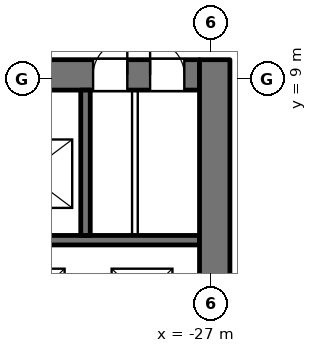
"""IFC4 building model, lengths in metres.
Left out: names, types, materials, properties, quantities, classifications, styles, units other than length and angle.
Written with IfcOpenShell. Run it as: python <this file> out.ifc"""

import sys

from ifc_helpers import new_model, si_unit, direction, frame, frame_2d, origin, place, context, subcontext, project, spatial, rectangle, extrude, element, fill, save


model = new_model("IFC4")
c1 = context("Model", 3, precision=1e-05, world=origin(), true_north=direction((0.0, 1.0)))
c2 = subcontext(c1, "Body", "Model", "MODEL_VIEW")
j1 = project(units=[si_unit("LENGTHUNIT", "METRE"), si_unit("PLANEANGLEUNIT", "RADIAN")], contexts=[c1])
p1 = place(None, origin())
s1 = spatial("IfcSite", under=j1, at=p1, CompositionType="ELEMENT")
p2 = place(p1, origin())
s2 = spatial("IfcBuilding", under=s1, at=p2, CompositionType="ELEMENT")
p3 = place(p2, frame((0.0, 0.0, 22.8)))
s3 = spatial("IfcBuildingStorey", under=s2, at=p3, CompositionType="ELEMENT", Elevation=22.8)
p4 = place(p3, frame((-44.7, 4.75, 0.0), z_axis=(0.0, 0.0, 1.0), x_axis=(1.0, 0.0, 0.0)))
e1 = element("IfcWall", 1, at=p4, inside=s3, PredefinedType="SHEAR", context=c2, shape_type="SweptSolid", body=[
    extrude(rectangle(XDim=17.4, YDim=0.25, at=frame_2d((8.7, 0.0))), origin(), (0.0, 0.0, 1.0), 4.5),
])
p5 = place(p3, frame((-44.7, 9.1, 0.0), z_axis=(0.0, 0.0, 1.0), x_axis=(1.0, 0.0, 0.0)))
e2 = element("IfcWall", 2, at=p5, inside=s3, PredefinedType="SHEAR", context=c2, shape_type="SweptSolid", body=[
    extrude(rectangle(XDim=17.4, YDim=0.8, at=frame_2d((8.7, 0.0))), origin(), (0.0, 0.0, 1.0), 4.5),
])
p6 = place(p5, frame((8.9, 0.0, 0.0)))
e3 = element("IfcOpeningElement", 3, at=p6, cuts=e2, PredefinedType="OPENING", context=c2, shape_type="SweptSolid", body=[
    extrude(rectangle(XDim=1.2, YDim=2.1, at=frame_2d((0.6, 1.05))), frame((0.0, 0.41, 0.0), z_axis=(0.0, -1.0, 0.0), x_axis=(1.0, 0.0, 0.0)), (0.0, 0.0, 1.0), 0.82),
])
p7 = place(p5, frame((14.6, 0.0, 0.0)))
e4 = element("IfcOpeningElement", 4, at=p7, cuts=e2, PredefinedType="OPENING", context=c2, shape_type="SweptSolid", body=[
    extrude(rectangle(XDim=0.9, YDim=2.1, at=frame_2d((0.45, 1.05))), frame((0.0, 0.41, 0.0), z_axis=(0.0, -1.0, 0.0), x_axis=(1.0, 0.0, 0.0)), (0.0, 0.0, 1.0), 0.82),
])
p8 = place(p5, frame((16.1, 0.0, 0.0)))
e5 = element("IfcOpeningElement", 5, at=p8, cuts=e2, PredefinedType="OPENING", context=c2, shape_type="SweptSolid", body=[
    extrude(rectangle(XDim=0.9, YDim=2.1, at=frame_2d((0.45, 1.05))), frame((0.0, 0.41, 0.0), z_axis=(0.0, -1.0, 0.0), x_axis=(1.0, 0.0, 0.0)), (0.0, 0.0, 1.0), 0.82),
])
p9 = place(p3, frame((-30.3, 4.875, 0.0), z_axis=(0.0, 0.0, 1.0), x_axis=(0.0, 1.0, 0.0)))
e6 = element("IfcWall", 6, at=p9, inside=s3, PredefinedType="SHEAR", context=c2, shape_type="SweptSolid", body=[
    extrude(rectangle(XDim=3.825, YDim=0.25, at=frame_2d((1.913, 0.0))), origin(), (0.0, 0.0, 1.0), 4.5),
])
p10 = place(p3, frame((-29.0, 4.875, 0.0), z_axis=(0.0, 0.0, 1.0), x_axis=(0.0, 1.0, 0.0)))
e7 = element("IfcWall", 7, at=p10, inside=s3, PredefinedType="PARTITIONING", context=c2, shape_type="SweptSolid", body=[
    extrude(rectangle(XDim=3.825, YDim=0.15, at=frame_2d((1.913, 0.0))), origin(), (0.0, 0.0, 1.0), 4.5),
])
p11 = place(p3, frame((-26.9, -9.5, 0.0), z_axis=(0.0, 0.0, 1.0), x_axis=(0.0, 1.0, 0.0)))
e8 = element("IfcWall", 8, at=p11, inside=s3, PredefinedType="SHEAR", context=c2, shape_type="SweptSolid", body=[
    extrude(rectangle(XDim=19.0, YDim=0.8, at=frame_2d((9.5, 0.0))), origin(), (0.0, 0.0, 1.0), 4.5),
])
p12 = place(p11, frame((8.3, 0.0, 0.0)))
e9 = element("IfcOpeningElement", 9, at=p12, cuts=e8, PredefinedType="OPENING", context=c2, shape_type="SweptSolid", body=[
    extrude(rectangle(XDim=2.4, YDim=2.1, at=frame_2d((1.2, 1.05))), frame((0.0, 0.41, 0.0), z_axis=(0.0, -1.0, 0.0), x_axis=(1.0, 0.0, 0.0)), (0.0, 0.0, 1.0), 0.82),
])
p13 = place(p7, origin())
e10 = element("IfcDoor", 10, at=p13, inside=s3, OperationType="SINGLE_SWING_RIGHT", PredefinedType="DOOR", context=c2, shape_type="SweptSolid", body=[
    extrude(rectangle(XDim=0.9, YDim=2.1, at=frame_2d((0.45, 1.05))), frame((0.0, -0.225, 0.0), z_axis=(0.0, -1.0, 0.0), x_axis=(1.0, 0.0, 0.0)), (0.0, 0.0, 1.0), 0.05),
])
fill(e4, e10)
p14 = place(p8, origin())
e11 = element("IfcDoor", 11, at=p14, inside=s3, OperationType="SINGLE_SWING_LEFT", PredefinedType="DOOR", context=c2, shape_type="SweptSolid", body=[
    extrude(rectangle(XDim=0.9, YDim=2.1, at=frame_2d((0.45, 1.05))), frame((0.0, -0.225, 0.0), z_axis=(0.0, -1.0, 0.0), x_axis=(1.0, 0.0, 0.0)), (0.0, 0.0, 1.0), 0.05),
])
fill(e5, e11)
save(model, sys.argv[1])
